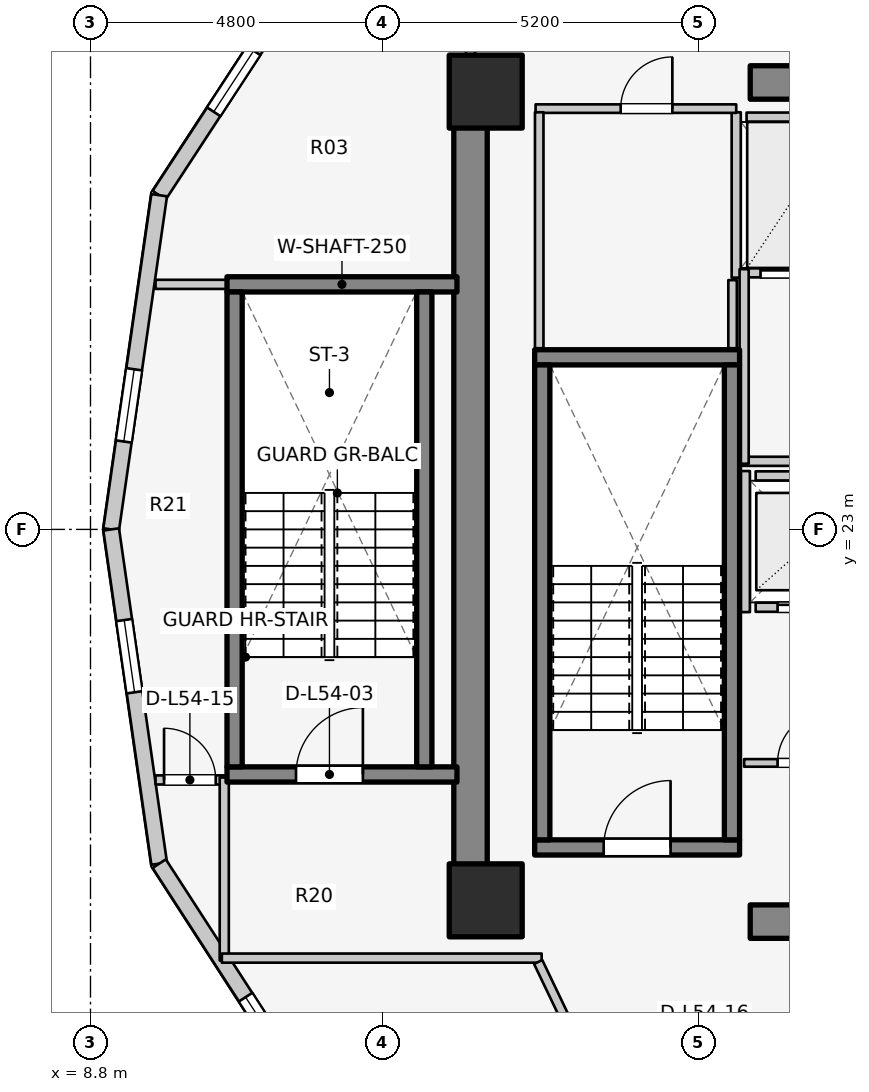
"""IFC4 building model, lengths in metres.
Left out: names, types, materials, properties, quantities, classifications, styles, units other than length and angle.
Written with IfcOpenShell. Run it as: python <this file> out.ifc"""

import sys

from ifc_helpers import new_model, si_unit, direction, frame, frame_2d, origin, origin_2d, place, context, subcontext, project, spatial, rectangle, extrude, element, fill, save


model = new_model("IFC4")
c1 = context("Model", 3, precision=1e-05, world=origin(), true_north=direction((0.0, 1.0)))
c2 = subcontext(c1, "Body", "Model", "MODEL_VIEW")
j1 = project(units=[si_unit("LENGTHUNIT", "METRE"), si_unit("PLANEANGLEUNIT", "RADIAN")], contexts=[c1])
p1 = place(None, origin())
s1 = spatial("IfcSite", under=j1, at=p1, CompositionType="ELEMENT")
p2 = place(p1, origin())
s2 = spatial("IfcBuilding", under=s1, at=p2, CompositionType="ELEMENT")
p3 = place(p2, frame((0.0, 0.0, 177.7)))
s3 = spatial("IfcBuildingStorey", under=s2, at=p3, CompositionType="ELEMENT", Elevation=177.7)
p4 = place(p3, frame((15.05, 17.05, 0.0), z_axis=(0.0, 0.0, 1.0), x_axis=(0.0, 1.0, 0.0)))
e1 = element("IfcWall", 1, at=p4, inside=s3, PredefinedType="SHEAR", context=c2, shape_type="SweptSolid", body=[
    extrude(rectangle(XDim=12.8, YDim=0.55, at=frame_2d((6.4, 0.0))), origin(), (0.0, 0.0, 1.0), 3.1),
])
for number, where, z_axis, x_axis in (
    (2, (19.65, 16.55, 0.0), (0.0, 0.0, 1.0), (1.0, 0.0, 0.0)),
    (3, (19.65, 30.35, 0.0), (0.0, 0.0, 1.0), (1.0, 0.0, 0.0)),
):
    element("IfcWall", number, at=place(p3, frame(where, z_axis=z_axis, x_axis=x_axis)), inside=s3, PredefinedType="SHEAR", context=c2, shape_type="SweptSolid", body=[
        extrude(rectangle(XDim=4.5, YDim=0.55, at=frame_2d((2.25, 0.0))), origin(), (0.0, 0.0, 1.0), 3.1),
    ])
p5 = place(p3, frame((16.105, 17.77, 0.0), z_axis=(0.0, 0.0, 1.0), x_axis=(1.0, 0.0, 0.0)))
e4 = element("IfcWall", 4, at=p5, inside=s3, PredefinedType="SOLIDWALL", context=c2, shape_type="SweptSolid", body=[
    extrude(rectangle(XDim=3.37, YDim=0.25, at=frame_2d((1.685, 0.0))), origin(), (0.0, 0.0, 1.0), 3.1),
])
p6 = place(p5, frame((1.135, 0.0, 0.0)))
e5 = element("IfcOpeningElement", 5, at=p6, cuts=e4, PredefinedType="OPENING", context=c2, shape_type="SweptSolid", body=[
    extrude(rectangle(XDim=1.1, YDim=2.1, at=frame_2d((0.55, 1.05))), frame((0.0, 0.135, 0.0), z_axis=(0.0, -1.0, 0.0), x_axis=(1.0, 0.0, 0.0)), (0.0, 0.0, 1.0), 0.27),
])
p7 = place(p3, frame((16.105, 25.83, 0.0), z_axis=(0.0, 0.0, 1.0), x_axis=(1.0, 0.0, 0.0)))
e6 = element("IfcWall", 6, at=p7, inside=s3, PredefinedType="SOLIDWALL", context=c2, shape_type="SweptSolid", body=[
    extrude(rectangle(XDim=3.37, YDim=0.25, at=frame_2d((1.685, 0.0))), origin(), (0.0, 0.0, 1.0), 3.1),
])
for number, where, z_axis, x_axis in (
    (7, (16.23, 17.895, 0.0), (0.0, 0.0, 1.0), (0.0, 1.0, 0.0)),
    (8, (19.35, 17.895, 0.0), (0.0, 0.0, 1.0), (0.0, 1.0, 0.0)),
):
    element("IfcWall", number, at=place(p3, frame(where, z_axis=z_axis, x_axis=x_axis)), inside=s3, PredefinedType="SOLIDWALL", context=c2, shape_type="SweptSolid", body=[
        extrude(rectangle(XDim=7.81, YDim=0.25, at=frame_2d((3.905, 0.0))), origin(), (0.0, 0.0, 1.0), 3.1),
    ])
p8 = place(p3, frame((11.045, 18.97, 0.0), z_axis=(0.0, 0.0, 1.0), x_axis=(1.0, 0.0, 0.0)))
e9 = element("IfcWall", 9, at=p8, inside=s3, PredefinedType="SOLIDWALL", context=c2, shape_type="SweptSolid", body=[
    extrude(rectangle(XDim=3.782, YDim=0.25, at=frame_2d((1.891, 0.0))), origin(), (0.0, 0.0, 1.0), 3.1),
])
p9 = place(p8, frame((1.135, 0.0, 0.0)))
e10 = element("IfcOpeningElement", 10, at=p9, cuts=e9, PredefinedType="OPENING", context=c2, shape_type="SweptSolid", body=[
    extrude(rectangle(XDim=1.1, YDim=2.1, at=frame_2d((0.55, 1.05))), frame((0.0, 0.135, 0.0), z_axis=(0.0, -1.0, 0.0), x_axis=(1.0, 0.0, 0.0)), (0.0, 0.0, 1.0), 0.27),
])
p10 = place(p3, frame((11.045, 27.03, 0.0), z_axis=(0.0, 0.0, 1.0), x_axis=(1.0, 0.0, 0.0)))
e11 = element("IfcWall", 11, at=p10, inside=s3, PredefinedType="SOLIDWALL", context=c2, shape_type="SweptSolid", body=[
    extrude(rectangle(XDim=3.782, YDim=0.25, at=frame_2d((1.891, 0.0))), origin(), (0.0, 0.0, 1.0), 3.1),
])
for number, where, z_axis, x_axis in (
    (12, (11.17, 19.095, 0.0), (0.0, 0.0, 1.0), (0.0, 1.0, 0.0)),
    (13, (14.29, 19.095, 0.0), (0.0, 0.0, 1.0), (0.0, 1.0, 0.0)),
):
    element("IfcWall", number, at=place(p3, frame(where, z_axis=z_axis, x_axis=x_axis)), inside=s3, PredefinedType="SOLIDWALL", context=c2, shape_type="SweptSolid", body=[
        extrude(rectangle(XDim=7.81, YDim=0.25, at=frame_2d((3.905, 0.0))), origin(), (0.0, 0.0, 1.0), 3.1),
    ])
for number, where, z_axis, x_axis in (
    (14, (15.3, 16.9, 0.0), (0.0, 0.0, 1.0), (1.0, 0.0, 0.0)),
    (15, (15.3, 30.2, 0.0), (0.0, 0.0, 1.0), (1.0, 0.0, 0.0)),
):
    element("IfcColumn", number, at=place(p3, frame(where, z_axis=z_axis, x_axis=x_axis)), inside=s3, PredefinedType="COLUMN", context=c2, shape_type="SweptSolid", body=[
        extrude(rectangle(XDim=1.2, YDim=1.2, at=origin_2d()), origin(), (0.0, 0.0, 1.0), 3.1),
    ])
p11 = place(p3, frame((12.381, 32.243, 0.0), z_axis=(0.0, 0.0, 1.0), x_axis=(-0.547456494366, -0.836834145322, 0.0)))
e16 = element("IfcWall", 16, at=p11, inside=s3, PredefinedType="STANDARD", context=c2, shape_type="SweptSolid", body=[
    extrude(rectangle(XDim=4.477, YDim=0.26, at=frame_2d((2.239, 0.0))), origin(), (0.0, 0.0, 1.0), 1.22),
])
p12 = place(p11, frame((1.639, 0.0, 0.15)))
e17 = element("IfcOpeningElement", 17, at=p12, cuts=e16, PredefinedType="OPENING", context=c2, shape_type="SweptSolid", body=[
    extrude(rectangle(XDim=1.2, YDim=0.9, at=frame_2d((0.6, 0.45))), frame((0.0, 0.14, 0.0), z_axis=(0.0, -1.0, 0.0), x_axis=(1.0, 0.0, 0.0)), (0.0, 0.0, 1.0), 0.28),
])
p13 = place(p3, frame((9.93, 28.497, 0.0), z_axis=(0.0, 0.0, 1.0), x_axis=(-0.142227632286, -0.989833976288, 0.0)))
e18 = element("IfcWall", 18, at=p13, inside=s3, PredefinedType="STANDARD", context=c2, shape_type="SweptSolid", body=[
    extrude(rectangle(XDim=5.553, YDim=0.26, at=frame_2d((2.776, 0.0))), origin(), (0.0, 0.0, 1.0), 2.57),
])
p14 = place(p13, frame((2.892, 0.0, 0.75)))
e19 = element("IfcOpeningElement", 19, at=p14, cuts=e18, PredefinedType="OPENING", context=c2, shape_type="SweptSolid", body=[
    extrude(rectangle(XDim=1.2, YDim=1.5, at=frame_2d((0.6, 0.75))), frame((0.0, 0.14, 0.0), z_axis=(0.0, -1.0, 0.0), x_axis=(1.0, 0.0, 0.0)), (0.0, 0.0, 1.0), 0.28),
])
p15 = place(p3, frame((9.14, 23.0, 0.0), z_axis=(0.0, 0.0, 1.0), x_axis=(0.142227632286, -0.989833976288, 0.0)))
e20 = element("IfcWall", 20, at=p15, inside=s3, PredefinedType="STANDARD", context=c2, shape_type="SweptSolid", body=[
    extrude(rectangle(XDim=5.553, YDim=0.26, at=frame_2d((2.776, 0.0))), origin(), (0.0, 0.0, 1.0), 2.57),
])
p16 = place(p15, frame((1.506, 0.0, 0.75)))
e21 = element("IfcOpeningElement", 21, at=p16, cuts=e20, PredefinedType="OPENING", context=c2, shape_type="SweptSolid", body=[
    extrude(rectangle(XDim=1.2, YDim=1.5, at=frame_2d((0.6, 0.75))), frame((0.0, 0.14, 0.0), z_axis=(0.0, -1.0, 0.0), x_axis=(1.0, 0.0, 0.0)), (0.0, 0.0, 1.0), 0.28),
])
p17 = place(p3, frame((9.93, 17.503, 0.0), z_axis=(0.0, 0.0, 1.0), x_axis=(0.543358984534, -0.839500454989, 0.0)))
e22 = element("IfcWall", 22, at=p17, inside=s3, PredefinedType="STANDARD", context=c2, shape_type="SweptSolid", body=[
    extrude(rectangle(XDim=4.511, YDim=0.26, at=frame_2d((2.256, 0.0))), origin(), (0.0, 0.0, 1.0), 1.22),
])
p18 = place(p17, frame((2.615, 0.0, 0.15)))
e23 = element("IfcOpeningElement", 23, at=p18, cuts=e22, PredefinedType="OPENING", context=c2, shape_type="SweptSolid", body=[
    extrude(rectangle(XDim=1.2, YDim=0.9, at=frame_2d((0.6, 0.45))), frame((0.0, 0.14, 0.0), z_axis=(0.0, -1.0, 0.0), x_axis=(1.0, 0.0, 0.0)), (0.0, 0.0, 1.0), 0.28),
])
p19 = place(p3, frame((19.74, 21.72, 0.0), z_axis=(0.0, 0.0, 1.0), x_axis=(1.0, 0.0, 0.0)))
e24 = element("IfcWall", 24, at=p19, inside=s3, PredefinedType="SOLIDWALL", context=c2, shape_type="SweptSolid", body=[
    extrude(rectangle(XDim=1.82, YDim=0.15, at=frame_2d((0.91, 0.0))), origin(), (0.0, 0.0, 1.0), 2.575),
])
p20 = place(p19, frame((0.36, 0.0, 0.0)))
e25 = element("IfcOpeningElement", 25, at=p20, cuts=e24, PredefinedType="OPENING", context=c2, shape_type="SweptSolid", body=[
    extrude(rectangle(XDim=1.1, YDim=2.1, at=frame_2d((0.55, 1.05))), frame((0.0, 0.085, 0.0), z_axis=(0.0, -1.0, 0.0), x_axis=(1.0, 0.0, 0.0)), (0.0, 0.0, 1.0), 0.17),
])
p21 = place(p3, frame((19.74, 23.88, 0.0), z_axis=(0.0, 0.0, 1.0), x_axis=(1.0, 0.0, 0.0)))
e26 = element("IfcWall", 26, at=p21, inside=s3, PredefinedType="SOLIDWALL", context=c2, shape_type="SweptSolid", body=[
    extrude(rectangle(XDim=1.82, YDim=0.15, at=frame_2d((0.91, 0.0))), origin(), (0.0, 0.0, 1.0), 2.575),
])
p22 = place(p3, frame((19.57, 21.64, 0.0), z_axis=(0.0, 0.0, 1.0), x_axis=(0.0, 1.0, 0.0)))
e27 = element("IfcWall", 27, at=p22, inside=s3, PredefinedType="SOLIDWALL", context=c2, shape_type="SweptSolid", body=[
    extrude(rectangle(XDim=2.32, YDim=0.15, at=frame_2d((1.16, 0.0))), origin(), (0.0, 0.0, 1.0), 2.575),
])
p23 = place(p3, frame((19.59, 27.22, 0.0), z_axis=(0.0, 0.0, 1.0), x_axis=(1.0, 0.0, 0.0)))
e28 = element("IfcWall", 28, at=p23, inside=s3, PredefinedType="SOLIDWALL", context=c2, shape_type="SweptSolid", body=[
    extrude(rectangle(XDim=1.76, YDim=0.15, at=frame_2d((0.88, 0.0))), origin(), (0.0, 0.0, 1.0), 2.575),
])
p24 = place(p23, frame((0.23, 0.0, 0.0)))
e29 = element("IfcOpeningElement", 29, at=p24, cuts=e28, PredefinedType="OPENING", context=c2, shape_type="SweptSolid", body=[
    extrude(rectangle(XDim=1.3, YDim=2.1, at=frame_2d((0.65, 1.05))), frame((0.0, 0.085, 0.0), z_axis=(0.0, -1.0, 0.0), x_axis=(1.0, 0.0, 0.0)), (0.0, 0.0, 1.0), 0.17),
])
p25 = place(p3, frame((19.59, 29.78, 0.0), z_axis=(0.0, 0.0, 1.0), x_axis=(1.0, 0.0, 0.0)))
e30 = element("IfcWall", 30, at=p25, inside=s3, PredefinedType="SOLIDWALL", context=c2, shape_type="SweptSolid", body=[
    extrude(rectangle(XDim=1.76, YDim=0.15, at=frame_2d((0.88, 0.0))), origin(), (0.0, 0.0, 1.0), 2.575),
])
p26 = place(p3, frame((19.42, 27.14, 0.0), z_axis=(0.0, 0.0, 1.0), x_axis=(0.0, 1.0, 0.0)))
e31 = element("IfcWall", 31, at=p26, inside=s3, PredefinedType="SOLIDWALL", context=c2, shape_type="SweptSolid", body=[
    extrude(rectangle(XDim=2.72, YDim=0.15, at=frame_2d((1.36, 0.0))), origin(), (0.0, 0.0, 1.0), 2.575),
])
p27 = place(p3, frame((19.52, 24.12, 0.0), z_axis=(0.0, 0.0, 1.0), x_axis=(1.0, 0.0, 0.0)))
e32 = element("IfcWall", 32, at=p27, inside=s3, PredefinedType="PARTITIONING", context=c2, shape_type="SweptSolid", body=[
    extrude(rectangle(XDim=5.08, YDim=0.15, at=frame_2d((2.54, 0.0))), origin(), (0.0, 0.0, 1.0), 2.12),
])
p28 = place(p3, frame((19.55, 24.08, 0.0), z_axis=(0.0, 0.0, 1.0), x_axis=(0.0, 1.0, 0.0)))
e33 = element("IfcWall", 33, at=p28, inside=s3, PredefinedType="PARTITIONING", context=c2, shape_type="SweptSolid", body=[
    extrude(rectangle(XDim=3.2, YDim=0.15, at=frame_2d((1.6, 0.0))), origin(), (0.0, 0.0, 1.0), 2.575),
])
p29 = place(p3, frame((19.55, 19.16, 0.0), z_axis=(0.0, 0.0, 1.0), x_axis=(1.0, 0.0, 0.0)))
e34 = element("IfcWall", 34, at=p29, inside=s3, PredefinedType="PARTITIONING", context=c2, shape_type="SweptSolid", body=[
    extrude(rectangle(XDim=3.45, YDim=0.125, at=frame_2d((1.725, 0.0))), origin(), (0.0, 0.0, 1.0), 2.12),
])
p30 = place(p29, frame((0.55, 0.0, 0.0)))
e35 = element("IfcOpeningElement", 35, at=p30, cuts=e34, PredefinedType="OPENING", context=c2, shape_type="SweptSolid", body=[
    extrude(rectangle(XDim=0.85, YDim=2.05, at=frame_2d((0.425, 1.025))), frame((0.0, 0.073, 0.0), z_axis=(0.0, -1.0, 0.0), x_axis=(1.0, 0.0, 0.0)), (0.0, 0.0, 1.0), 0.145),
])
p31 = place(p3, frame((16.12, 29.92, 0.0), z_axis=(0.0, 0.0, 1.0), x_axis=(1.0, 0.0, 0.0)))
e36 = element("IfcWall", 36, at=p31, inside=s3, PredefinedType="PLUMBINGWALL", context=c2, shape_type="SweptSolid", body=[
    extrude(rectangle(XDim=3.3, YDim=0.14, at=frame_2d((1.65, 0.0))), origin(), (0.0, 0.0, 1.0), 2.575),
])
p32 = place(p31, frame((1.399, 0.0, 0.0)))
e37 = element("IfcOpeningElement", 37, at=p32, cuts=e36, PredefinedType="OPENING", context=c2, shape_type="SweptSolid", body=[
    extrude(rectangle(XDim=0.85, YDim=2.05, at=frame_2d((0.425, 1.025))), frame((0.0, 0.08, 0.0), z_axis=(0.0, -1.0, 0.0), x_axis=(1.0, 0.0, 0.0)), (0.0, 0.0, 1.0), 0.16),
])
p33 = place(p3, frame((16.18, 25.98, 0.0), z_axis=(0.0, 0.0, 1.0), x_axis=(0.0, 1.0, 0.0)))
e38 = element("IfcWall", 38, at=p33, inside=s3, PredefinedType="PLUMBINGWALL", context=c2, shape_type="SweptSolid", body=[
    extrude(rectangle(XDim=3.88, YDim=0.14, at=frame_2d((1.94, 0.0))), origin(), (0.0, 0.0, 1.0), 2.575),
])
p34 = place(p3, frame((19.36, 25.98, 0.0), z_axis=(0.0, 0.0, 1.0), x_axis=(0.0, 1.0, 0.0)))
e39 = element("IfcWall", 39, at=p34, inside=s3, PredefinedType="PLUMBINGWALL", context=c2, shape_type="SweptSolid", body=[
    extrude(rectangle(XDim=1.12, YDim=0.14, at=frame_2d((0.56, 0.0))), origin(), (0.0, 0.0, 1.0), 2.575),
])
p35 = place(p3, frame((9.87, 27.03, 0.0), z_axis=(0.0, 0.0, 1.0), x_axis=(1.0, 0.0, 0.0)))
e40 = element("IfcWall", 40, at=p35, inside=s3, PredefinedType="PARTITIONING", context=c2, shape_type="SweptSolid", body=[
    extrude(rectangle(XDim=1.17, YDim=0.15, at=frame_2d((0.585, 0.0))), origin(), (0.0, 0.0, 1.0), 2.575),
])
p36 = place(p3, frame((15.05, 29.8, 0.0), z_axis=(0.0, 0.0, 1.0), x_axis=(0.0, 1.0, 0.0)))
e41 = element("IfcWall", 41, at=p36, inside=s3, PredefinedType="PARTITIONING", context=c2, shape_type="SweptSolid", body=[
    extrude(rectangle(XDim=1.29, YDim=0.15, at=frame_2d((0.645, 0.0))), origin(), (0.0, 0.0, 1.0), 1.22),
])
p37 = place(p3, frame((9.87, 18.88, 0.0), z_axis=(0.0, 0.0, 1.0), x_axis=(1.0, 0.0, 0.0)))
e42 = element("IfcWall", 42, at=p37, inside=s3, PredefinedType="PARTITIONING", context=c2, shape_type="SweptSolid", body=[
    extrude(rectangle(XDim=1.17, YDim=0.15, at=frame_2d((0.585, 0.0))), origin(), (0.0, 0.0, 1.0), 2.575),
])
p38 = place(p37, frame((0.14, 0.0, 0.0)))
e43 = element("IfcOpeningElement", 43, at=p38, cuts=e42, PredefinedType="OPENING", context=c2, shape_type="SweptSolid", body=[
    extrude(rectangle(XDim=0.85, YDim=2.05, at=frame_2d((0.425, 1.025))), frame((0.0, 0.085, 0.0), z_axis=(0.0, -1.0, 0.0), x_axis=(1.0, 0.0, 0.0)), (0.0, 0.0, 1.0), 0.17),
])
p39 = place(p3, frame((11.0, 15.91, 0.0), z_axis=(0.0, 0.0, 1.0), x_axis=(0.0, 1.0, 0.0)))
e44 = element("IfcWall", 44, at=p39, inside=s3, PredefinedType="PARTITIONING", context=c2, shape_type="SweptSolid", body=[
    extrude(rectangle(XDim=3.01, YDim=0.15, at=frame_2d((1.505, 0.0))), origin(), (0.0, 0.0, 1.0), 2.575),
])
p40 = place(p3, frame((10.96, 15.95, 0.0), z_axis=(0.0, 0.0, 1.0), x_axis=(1.0, 0.0, 0.0)))
e45 = element("IfcWall", 45, at=p40, inside=s3, PredefinedType="PARTITIONING", context=c2, shape_type="SweptSolid", body=[
    extrude(rectangle(XDim=5.26, YDim=0.15, at=frame_2d((2.63, 0.0))), origin(), (0.0, 0.0, 1.0), 1.22),
])
p41 = place(p3, frame((17.222, 13.675, 0.0), z_axis=(0.0, 0.0, 1.0), x_axis=(-0.431973389813, 0.901886351207, 0.0)))
e46 = element("IfcWall", 46, at=p41, inside=s3, PredefinedType="PARTITIONING", context=c2, shape_type="SweptSolid", body=[
    extrude(rectangle(XDim=2.452, YDim=0.15, at=frame_2d((1.226, 0.0))), origin(), (0.0, 0.0, 1.0), 2.575),
])
p42 = place(p12, origin())
e47 = element("IfcWindow", 47, at=p42, inside=s3, PartitioningType="SINGLE_PANEL", PredefinedType="WINDOW", context=c2, shape_type="SweptSolid", body=[
    extrude(rectangle(XDim=1.2, YDim=0.9, at=frame_2d((0.6, 0.45))), frame((0.0, 0.03, 0.0), z_axis=(0.0, -1.0, 0.0), x_axis=(1.0, 0.0, 0.0)), (0.0, 0.0, 1.0), 0.06),
])
fill(e17, e47)
p43 = place(p14, origin())
e48 = element("IfcWindow", 48, at=p43, inside=s3, PartitioningType="SINGLE_PANEL", PredefinedType="WINDOW", context=c2, shape_type="SweptSolid", body=[
    extrude(rectangle(XDim=1.2, YDim=1.5, at=frame_2d((0.6, 0.75))), frame((0.0, 0.03, 0.0), z_axis=(0.0, -1.0, 0.0), x_axis=(1.0, 0.0, 0.0)), (0.0, 0.0, 1.0), 0.06),
])
fill(e19, e48)
p44 = place(p16, origin())
e49 = element("IfcWindow", 49, at=p44, inside=s3, PartitioningType="SINGLE_PANEL", PredefinedType="WINDOW", context=c2, shape_type="SweptSolid", body=[
    extrude(rectangle(XDim=1.2, YDim=1.5, at=frame_2d((0.6, 0.75))), frame((0.0, 0.03, 0.0), z_axis=(0.0, -1.0, 0.0), x_axis=(1.0, 0.0, 0.0)), (0.0, 0.0, 1.0), 0.06),
])
fill(e21, e49)
p45 = place(p18, origin())
e50 = element("IfcWindow", 50, at=p45, inside=s3, PartitioningType="SINGLE_PANEL", PredefinedType="WINDOW", context=c2, shape_type="SweptSolid", body=[
    extrude(rectangle(XDim=1.2, YDim=0.9, at=frame_2d((0.6, 0.45))), frame((0.0, 0.03, 0.0), z_axis=(0.0, -1.0, 0.0), x_axis=(1.0, 0.0, 0.0)), (0.0, 0.0, 1.0), 0.06),
])
fill(e23, e50)
p46 = place(p6, origin())
e51 = element("IfcDoor", 51, at=p46, inside=s3, OperationType="SINGLE_SWING_RIGHT", PredefinedType="DOOR", context=c2, shape_type="SweptSolid", body=[
    extrude(rectangle(XDim=1.1, YDim=2.1, at=frame_2d((0.55, 1.05))), frame((0.0, 0.025, 0.0), z_axis=(0.0, -1.0, 0.0), x_axis=(1.0, 0.0, 0.0)), (0.0, 0.0, 1.0), 0.05),
])
fill(e5, e51)
p47 = place(p9, origin())
e52 = element("IfcDoor", 52, at=p47, inside=s3, OperationType="SINGLE_SWING_RIGHT", PredefinedType="DOOR", context=c2, shape_type="SweptSolid", body=[
    extrude(rectangle(XDim=1.1, YDim=2.1, at=frame_2d((0.55, 1.05))), frame((0.0, 0.025, 0.0), z_axis=(0.0, -1.0, 0.0), x_axis=(1.0, 0.0, 0.0)), (0.0, 0.0, 1.0), 0.05),
])
fill(e10, e52)
p48 = place(p20, origin())
e53 = element("IfcDoor", 53, at=p48, inside=s3, OperationType="DOUBLE_DOOR_SLIDING", PredefinedType="DOOR", context=c2, shape_type="SweptSolid", body=[
    extrude(rectangle(XDim=1.1, YDim=2.1, at=frame_2d((0.55, 1.05))), frame((0.0, 0.025, 0.0), z_axis=(0.0, -1.0, 0.0), x_axis=(1.0, 0.0, 0.0)), (0.0, 0.0, 1.0), 0.05),
])
fill(e25, e53)
p49 = place(p24, origin())
e54 = element("IfcDoor", 54, at=p49, inside=s3, OperationType="DOUBLE_DOOR_SLIDING", PredefinedType="DOOR", context=c2, shape_type="SweptSolid", body=[
    extrude(rectangle(XDim=1.3, YDim=2.1, at=frame_2d((0.65, 1.05))), frame((0.0, 0.025, 0.0), z_axis=(0.0, -1.0, 0.0), x_axis=(1.0, 0.0, 0.0)), (0.0, 0.0, 1.0), 0.05),
])
fill(e29, e54)
p50 = place(p30, origin())
e55 = element("IfcDoor", 55, at=p50, inside=s3, OperationType="SINGLE_SWING_RIGHT", PredefinedType="DOOR", context=c2, shape_type="SweptSolid", body=[
    extrude(rectangle(XDim=0.85, YDim=2.05, at=frame_2d((0.425, 1.025))), frame((0.0, 0.025, 0.0), z_axis=(0.0, -1.0, 0.0), x_axis=(1.0, 0.0, 0.0)), (0.0, 0.0, 1.0), 0.05),
])
fill(e35, e55)
p51 = place(p32, origin())
e56 = element("IfcDoor", 56, at=p51, inside=s3, OperationType="SINGLE_SWING_RIGHT", PredefinedType="DOOR", context=c2, shape_type="SweptSolid", body=[
    extrude(rectangle(XDim=0.85, YDim=2.05, at=frame_2d((0.425, 1.025))), frame((0.0, 0.025, 0.0), z_axis=(0.0, -1.0, 0.0), x_axis=(1.0, 0.0, 0.0)), (0.0, 0.0, 1.0), 0.05),
])
fill(e37, e56)
p52 = place(p38, origin())
e57 = element("IfcDoor", 57, at=p52, inside=s3, OperationType="SINGLE_SWING_LEFT", PredefinedType="DOOR", context=c2, shape_type="SweptSolid", body=[
    extrude(rectangle(XDim=0.85, YDim=2.05, at=frame_2d((0.425, 1.025))), frame((0.0, 0.025, 0.0), z_axis=(0.0, -1.0, 0.0), x_axis=(1.0, 0.0, 0.0)), (0.0, 0.0, 1.0), 0.05),
])
fill(e43, e57)
save(model, sys.argv[1])
